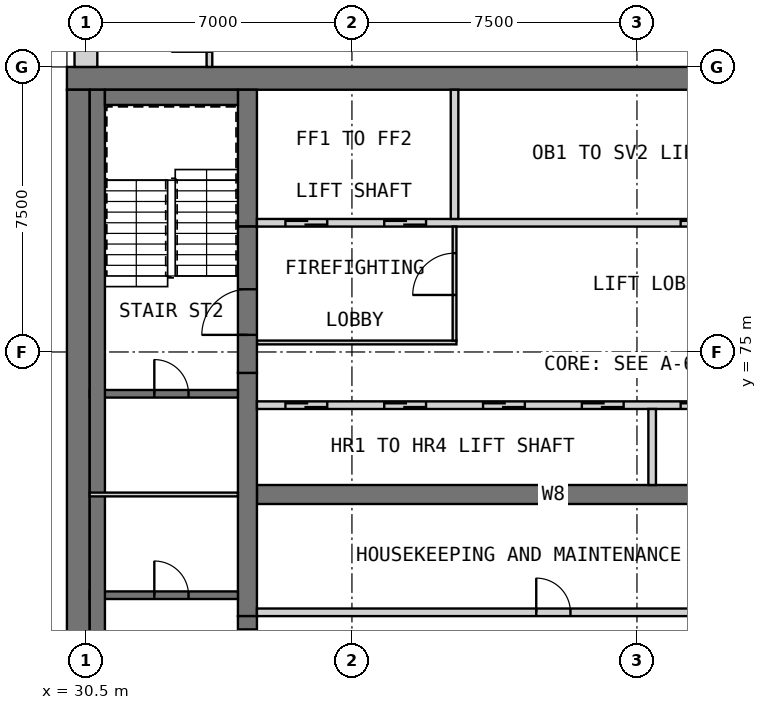
"""IFC4 building model, lengths in metres.
Left out: names, types, materials, properties, quantities, classifications, styles, units other than length and angle.
Written with IfcOpenShell. Run it as: python <this file> out.ifc"""

import sys

from ifc_helpers import new_model, si_unit, direction, frame, frame_2d, origin, place, context, subcontext, project, spatial, rectangle, extrude, element, fill, save


model = new_model("IFC4")
c1 = context("Model", 3, precision=1e-05, world=origin(), true_north=direction((0.0, 1.0)))
c2 = subcontext(c1, "Body", "Model", "MODEL_VIEW")
j1 = project(units=[si_unit("LENGTHUNIT", "METRE"), si_unit("PLANEANGLEUNIT", "RADIAN")], contexts=[c1])
p1 = place(None, origin())
s1 = spatial("IfcSite", under=j1, at=p1, CompositionType="ELEMENT")
p2 = place(p1, origin())
s2 = spatial("IfcBuilding", under=s1, at=p2, CompositionType="ELEMENT")
p3 = place(p2, frame((0.0, 0.0, 283.7)))
s3 = spatial("IfcBuildingStorey", under=s2, at=p3, CompositionType="ELEMENT", Elevation=283.7)
p4 = place(p3, frame((30.0, 82.2, 0.0), z_axis=(0.0, 0.0, 1.0), x_axis=(1.0, 0.0, 0.0)))
e1 = element("IfcWall", 1, at=p4, inside=s3, PredefinedType="SHEAR", context=c2, shape_type="SweptSolid", body=[
    extrude(rectangle(XDim=30.0, YDim=0.6, at=frame_2d((15.0, 0.0))), origin(), (0.0, 0.0, 1.0), 3.5),
])
p5 = place(p3, frame((30.3, 60.6, 0.0), z_axis=(0.0, 0.0, 1.0), x_axis=(0.0, 1.0, 0.0)))
e2 = element("IfcWall", 2, at=p5, inside=s3, PredefinedType="SHEAR", context=c2, shape_type="SweptSolid", body=[
    extrude(rectangle(XDim=21.3, YDim=0.6, at=frame_2d((10.65, 0.0))), origin(), (0.0, 0.0, 1.0), 3.5),
])
p6 = place(p3, frame((35.0, 71.25, 0.0), z_axis=(0.0, 0.0, 1.0), x_axis=(1.0, 0.0, 0.0)))
e3 = element("IfcWall", 3, at=p6, inside=s3, PredefinedType="SHEAR", context=c2, shape_type="SweptSolid", body=[
    extrude(rectangle(XDim=15.6, YDim=0.5, at=frame_2d((7.8, 0.0))), origin(), (0.0, 0.0, 1.0), 3.5),
])
p7 = place(p3, frame((34.75, 68.05, 0.0), z_axis=(0.0, 0.0, 1.0), x_axis=(0.0, 1.0, 0.0)))
e4 = element("IfcWall", 4, at=p7, inside=s3, PredefinedType="SHEAR", context=c2, shape_type="SweptSolid", body=[
    extrude(rectangle(XDim=6.4, YDim=0.5, at=frame_2d((3.2, 0.0))), origin(), (0.0, 0.0, 1.0), 3.5),
])
p8 = place(p3, frame((34.75, 78.3, 0.0), z_axis=(0.0, 0.0, 1.0), x_axis=(0.0, 1.0, 0.0)))
e5 = element("IfcWall", 5, at=p8, inside=s3, PredefinedType="SHEAR", context=c2, shape_type="SweptSolid", body=[
    extrude(rectangle(XDim=3.6, YDim=0.5, at=frame_2d((1.8, 0.0))), origin(), (0.0, 0.0, 1.0), 3.5),
])
p9 = place(p2, frame((0.0, 0.0, 34.0)))
s4 = spatial("IfcBuildingStorey", under=s2, at=p9, CompositionType="ELEMENT", Elevation=34.0)
for number, where, z_axis, x_axis in (
    (6, (29.7, 70.8, 0.0), (0.0, 0.0, 1.0), (0.0, 1.0, 0.0)),
    (7, (29.7, 75.675, 0.0), (0.0, 0.0, 1.0), (0.0, 1.0, 0.0)),
    (8, (29.7, 80.55, 0.0), (0.0, 0.0, 1.0), (0.0, 1.0, 0.0)),
):
    element("IfcWall", number, at=place(p9, frame(where, z_axis=z_axis, x_axis=x_axis)), inside=s4, PredefinedType="SOLIDWALL", context=c2, shape_type="SweptSolid", body=[
        extrude(rectangle(XDim=0.9, YDim=0.6, at=frame_2d((0.45, 0.0))), origin(), (0.0, 0.0, 1.0), 286.2),
    ])
p10 = place(p3, frame((30.5, 89.5, 0.0), z_axis=(0.0, 0.0, 1.0), x_axis=(0.0, -1.0, 0.0)))
e9 = element("IfcWall", 9, at=p10, inside=s3, PredefinedType="SOLIDWALL", context=c2, shape_type="SweptSolid", body=[
    extrude(rectangle(XDim=7.0, YDim=0.6, at=frame_2d((3.5, 0.0))), origin(), (0.0, 0.0, 1.0), 3.2),
])
p11 = place(p10, frame((3.925, 0.0, 0.8)))
e10 = element("IfcOpeningElement", 10, at=p11, cuts=e9, PredefinedType="OPENING", context=c2, shape_type="SweptSolid", body=[
    extrude(rectangle(XDim=2.4, YDim=1.8, at=frame_2d((1.2, 0.9))), frame((0.0, 0.31, 0.0), z_axis=(0.0, -1.0, 0.0), x_axis=(1.0, 0.0, 0.0)), (0.0, 0.0, 1.0), 0.62),
])
p12 = place(p10, frame((0.425, 0.0, 0.8)))
e11 = element("IfcOpeningElement", 11, at=p12, cuts=e9, PredefinedType="OPENING", context=c2, shape_type="SweptSolid", body=[
    extrude(rectangle(XDim=2.4, YDim=1.8, at=frame_2d((1.2, 0.9))), frame((0.0, 0.31, 0.0), z_axis=(0.0, -1.0, 0.0), x_axis=(1.0, 0.0, 0.0)), (0.0, 0.0, 1.0), 0.62),
])
p13 = place(p3, frame((35.0, 68.15, 0.0), z_axis=(0.0, 0.0, 1.0), x_axis=(1.0, 0.0, 0.0)))
e12 = element("IfcWall", 12, at=p13, inside=s3, PredefinedType="PARTITIONING", context=c2, shape_type="SweptSolid", body=[
    extrude(rectangle(XDim=15.6, YDim=0.2, at=frame_2d((7.8, 0.0))), origin(), (0.0, 0.0, 1.0), 3.2),
])
p14 = place(p13, frame((7.35, 0.0, 0.0)))
e13 = element("IfcOpeningElement", 13, at=p14, cuts=e12, PredefinedType="OPENING", context=c2, shape_type="SweptSolid", body=[
    extrude(rectangle(XDim=0.9, YDim=2.1, at=frame_2d((0.45, 1.05))), frame((0.0, 0.11, 0.0), z_axis=(0.0, -1.0, 0.0), x_axis=(1.0, 0.0, 0.0)), (0.0, 0.0, 1.0), 0.22),
])
p15 = place(p3, frame((35.0, 73.6, 0.0), z_axis=(0.0, 0.0, 1.0), x_axis=(1.0, 0.0, 0.0)))
e14 = element("IfcWall", 14, at=p15, inside=s3, PredefinedType="SOLIDWALL", context=c2, shape_type="SweptSolid", body=[
    extrude(rectangle(XDim=15.6, YDim=0.2, at=frame_2d((7.8, 0.0))), origin(), (0.0, 0.0, 1.0), 3.5),
])
p16 = place(p15, frame((0.75, 0.0, 0.0)))
e15 = element("IfcOpeningElement", 15, at=p16, cuts=e14, PredefinedType="OPENING", context=c2, shape_type="SweptSolid", body=[
    extrude(rectangle(XDim=1.1, YDim=2.1, at=frame_2d((0.55, 1.05))), frame((0.0, 0.11, 0.0), z_axis=(0.0, -1.0, 0.0), x_axis=(1.0, 0.0, 0.0)), (0.0, 0.0, 1.0), 0.22),
])
p17 = place(p15, frame((3.35, 0.0, 0.0)))
e16 = element("IfcOpeningElement", 16, at=p17, cuts=e14, PredefinedType="OPENING", context=c2, shape_type="SweptSolid", body=[
    extrude(rectangle(XDim=1.1, YDim=2.1, at=frame_2d((0.55, 1.05))), frame((0.0, 0.11, 0.0), z_axis=(0.0, -1.0, 0.0), x_axis=(1.0, 0.0, 0.0)), (0.0, 0.0, 1.0), 0.22),
])
p18 = place(p15, frame((5.95, 0.0, 0.0)))
e17 = element("IfcOpeningElement", 17, at=p18, cuts=e14, PredefinedType="OPENING", context=c2, shape_type="SweptSolid", body=[
    extrude(rectangle(XDim=1.1, YDim=2.1, at=frame_2d((0.55, 1.05))), frame((0.0, 0.11, 0.0), z_axis=(0.0, -1.0, 0.0), x_axis=(1.0, 0.0, 0.0)), (0.0, 0.0, 1.0), 0.22),
])
p19 = place(p15, frame((8.55, 0.0, 0.0)))
e18 = element("IfcOpeningElement", 18, at=p19, cuts=e14, PredefinedType="OPENING", context=c2, shape_type="SweptSolid", body=[
    extrude(rectangle(XDim=1.1, YDim=2.1, at=frame_2d((0.55, 1.05))), frame((0.0, 0.11, 0.0), z_axis=(0.0, -1.0, 0.0), x_axis=(1.0, 0.0, 0.0)), (0.0, 0.0, 1.0), 0.22),
])
p20 = place(p15, frame((11.15, 0.0, 0.0)))
e19 = element("IfcOpeningElement", 19, at=p20, cuts=e14, PredefinedType="OPENING", context=c2, shape_type="SweptSolid", body=[
    extrude(rectangle(XDim=1.1, YDim=2.1, at=frame_2d((0.55, 1.05))), frame((0.0, 0.11, 0.0), z_axis=(0.0, -1.0, 0.0), x_axis=(1.0, 0.0, 0.0)), (0.0, 0.0, 1.0), 0.22),
])
p21 = place(p15, frame((13.75, 0.0, 0.0)))
e20 = element("IfcOpeningElement", 20, at=p21, cuts=e14, PredefinedType="OPENING", context=c2, shape_type="SweptSolid", body=[
    extrude(rectangle(XDim=1.1, YDim=2.1, at=frame_2d((0.55, 1.05))), frame((0.0, 0.11, 0.0), z_axis=(0.0, -1.0, 0.0), x_axis=(1.0, 0.0, 0.0)), (0.0, 0.0, 1.0), 0.22),
])
p22 = place(p3, frame((45.4, 71.5, 0.0), z_axis=(0.0, 0.0, 1.0), x_axis=(0.0, 1.0, 0.0)))
e21 = element("IfcWall", 21, at=p22, inside=s3, PredefinedType="SOLIDWALL", context=c2, shape_type="SweptSolid", body=[
    extrude(rectangle(XDim=2.0, YDim=0.2, at=frame_2d((1.0, 0.0))), origin(), (0.0, 0.0, 1.0), 3.5),
])
p23 = place(p3, frame((35.0, 78.4, 0.0), z_axis=(0.0, 0.0, 1.0), x_axis=(1.0, 0.0, 0.0)))
e22 = element("IfcWall", 22, at=p23, inside=s3, PredefinedType="SOLIDWALL", context=c2, shape_type="SweptSolid", body=[
    extrude(rectangle(XDim=15.6, YDim=0.2, at=frame_2d((7.8, 0.0))), origin(), (0.0, 0.0, 1.0), 3.5),
])
p24 = place(p23, frame((0.75, 0.0, 0.0)))
e23 = element("IfcOpeningElement", 23, at=p24, cuts=e22, PredefinedType="OPENING", context=c2, shape_type="SweptSolid", body=[
    extrude(rectangle(XDim=1.1, YDim=2.1, at=frame_2d((0.55, 1.05))), frame((0.0, 0.11, 0.0), z_axis=(0.0, -1.0, 0.0), x_axis=(1.0, 0.0, 0.0)), (0.0, 0.0, 1.0), 0.22),
])
p25 = place(p23, frame((3.35, 0.0, 0.0)))
e24 = element("IfcOpeningElement", 24, at=p25, cuts=e22, PredefinedType="OPENING", context=c2, shape_type="SweptSolid", body=[
    extrude(rectangle(XDim=1.1, YDim=2.1, at=frame_2d((0.55, 1.05))), frame((0.0, 0.11, 0.0), z_axis=(0.0, -1.0, 0.0), x_axis=(1.0, 0.0, 0.0)), (0.0, 0.0, 1.0), 0.22),
])
p26 = place(p23, frame((11.15, 0.0, 0.0)))
e25 = element("IfcOpeningElement", 25, at=p26, cuts=e22, PredefinedType="OPENING", context=c2, shape_type="SweptSolid", body=[
    extrude(rectangle(XDim=1.1, YDim=2.1, at=frame_2d((0.55, 1.05))), frame((0.0, 0.11, 0.0), z_axis=(0.0, -1.0, 0.0), x_axis=(1.0, 0.0, 0.0)), (0.0, 0.0, 1.0), 0.22),
])
p27 = place(p23, frame((13.75, 0.0, 0.0)))
e26 = element("IfcOpeningElement", 26, at=p27, cuts=e22, PredefinedType="OPENING", context=c2, shape_type="SweptSolid", body=[
    extrude(rectangle(XDim=1.1, YDim=2.1, at=frame_2d((0.55, 1.05))), frame((0.0, 0.11, 0.0), z_axis=(0.0, -1.0, 0.0), x_axis=(1.0, 0.0, 0.0)), (0.0, 0.0, 1.0), 0.22),
])
p28 = place(p3, frame((40.2, 78.5, 0.0), z_axis=(0.0, 0.0, 1.0), x_axis=(0.0, 1.0, 0.0)))
e27 = element("IfcWall", 27, at=p28, inside=s3, PredefinedType="SOLIDWALL", context=c2, shape_type="SweptSolid", body=[
    extrude(rectangle(XDim=3.4, YDim=0.2, at=frame_2d((1.7, 0.0))), origin(), (0.0, 0.0, 1.0), 3.5),
])
p29 = place(p3, frame((35.0, 75.25, 0.0), z_axis=(0.0, 0.0, 1.0), x_axis=(1.0, 0.0, 0.0)))
e28 = element("IfcWall", 28, at=p29, inside=s3, PredefinedType="PARTITIONING", context=c2, shape_type="SweptSolid", body=[
    extrude(rectangle(XDim=5.25, YDim=0.1, at=frame_2d((2.625, 0.0))), origin(), (0.0, 0.0, 1.0), 3.2),
])
p30 = place(p3, frame((40.2, 75.3, 0.0), z_axis=(0.0, 0.0, 1.0), x_axis=(0.0, 1.0, 0.0)))
e29 = element("IfcWall", 29, at=p30, inside=s3, PredefinedType="PARTITIONING", context=c2, shape_type="SweptSolid", body=[
    extrude(rectangle(XDim=3.0, YDim=0.1, at=frame_2d((1.5, 0.0))), origin(), (0.0, 0.0, 1.0), 3.2),
])
p31 = place(p30, frame((1.2, 0.0, 0.0)))
e30 = element("IfcOpeningElement", 30, at=p31, cuts=e29, PredefinedType="OPENING", context=c2, shape_type="SweptSolid", body=[
    extrude(rectangle(XDim=1.1, YDim=2.1, at=frame_2d((0.55, 1.05))), frame((0.0, 0.06, 0.0), z_axis=(0.0, -1.0, 0.0), x_axis=(1.0, 0.0, 0.0)), (0.0, 0.0, 1.0), 0.12),
])
p32 = place(p3, frame((34.75, 64.2, 0.0), z_axis=(0.0, 0.0, 1.0), x_axis=(0.0, 1.0, 0.0)))
e31 = element("IfcWall", 31, at=p32, inside=s3, PredefinedType="SOLIDWALL", context=c2, shape_type="SweptSolid", body=[
    extrude(rectangle(XDim=3.85, YDim=0.5, at=frame_2d((1.925, 0.0))), origin(), (0.0, 0.0, 1.0), 2.3),
])
p33 = place(p32, frame((2.3, 0.0, 0.0)))
e32 = element("IfcOpeningElement", 32, at=p33, cuts=e31, PredefinedType="OPENING", context=c2, shape_type="SweptSolid", body=[
    extrude(rectangle(XDim=1.2, YDim=2.1, at=frame_2d((0.6, 1.05))), frame((0.0, 0.26, 0.0), z_axis=(0.0, -1.0, 0.0), x_axis=(1.0, 0.0, 0.0)), (0.0, 0.0, 1.0), 0.52),
])
p34 = place(p3, frame((34.75, 74.45, 0.0), z_axis=(0.0, 0.0, 1.0), x_axis=(0.0, 1.0, 0.0)))
e33 = element("IfcWall", 33, at=p34, inside=s3, PredefinedType="SOLIDWALL", context=c2, shape_type="SweptSolid", body=[
    extrude(rectangle(XDim=3.85, YDim=0.5, at=frame_2d((1.925, 0.0))), origin(), (0.0, 0.0, 1.0), 2.3),
])
p35 = place(p34, frame((1.0, 0.0, 0.0)))
e34 = element("IfcOpeningElement", 34, at=p35, cuts=e33, PredefinedType="OPENING", context=c2, shape_type="SweptSolid", body=[
    extrude(rectangle(XDim=1.2, YDim=2.1, at=frame_2d((0.6, 1.05))), frame((0.0, 0.26, 0.0), z_axis=(0.0, -1.0, 0.0), x_axis=(1.0, 0.0, 0.0)), (0.0, 0.0, 1.0), 0.52),
])
p36 = place(p3, frame((30.6, 68.6, 0.0), z_axis=(0.0, 0.0, 1.0), x_axis=(1.0, 0.0, 0.0)))
e35 = element("IfcWall", 35, at=p36, inside=s3, PredefinedType="SOLIDWALL", context=c2, shape_type="SweptSolid", body=[
    extrude(rectangle(XDim=3.9, YDim=0.2, at=frame_2d((1.95, 0.0))), origin(), (0.0, 0.0, 1.0), 3.2),
])
p37 = place(p36, frame((1.7, 0.0, 0.0)))
e36 = element("IfcOpeningElement", 36, at=p37, cuts=e35, PredefinedType="OPENING", context=c2, shape_type="SweptSolid", body=[
    extrude(rectangle(XDim=0.9, YDim=2.1, at=frame_2d((0.45, 1.05))), frame((0.0, 0.11, 0.0), z_axis=(0.0, -1.0, 0.0), x_axis=(1.0, 0.0, 0.0)), (0.0, 0.0, 1.0), 0.22),
])
p38 = place(p3, frame((30.6, 73.9, 0.0), z_axis=(0.0, 0.0, 1.0), x_axis=(1.0, 0.0, 0.0)))
e37 = element("IfcWall", 37, at=p38, inside=s3, PredefinedType="SOLIDWALL", context=c2, shape_type="SweptSolid", body=[
    extrude(rectangle(XDim=3.9, YDim=0.2, at=frame_2d((1.95, 0.0))), origin(), (0.0, 0.0, 1.0), 3.2),
])
p39 = place(p38, frame((1.7, 0.0, 0.0)))
e38 = element("IfcOpeningElement", 38, at=p39, cuts=e37, PredefinedType="OPENING", context=c2, shape_type="SweptSolid", body=[
    extrude(rectangle(XDim=0.9, YDim=2.1, at=frame_2d((0.45, 1.05))), frame((0.0, 0.11, 0.0), z_axis=(0.0, -1.0, 0.0), x_axis=(1.0, 0.0, 0.0)), (0.0, 0.0, 1.0), 0.22),
])
p40 = place(p3, frame((30.8, 60.6, 0.0), z_axis=(0.0, 0.0, 1.0), x_axis=(0.0, 1.0, 0.0)))
e39 = element("IfcWall", 39, at=p40, inside=s3, PredefinedType="SOLIDWALL", context=c2, shape_type="SweptSolid", body=[
    extrude(rectangle(XDim=21.3, YDim=0.4, at=frame_2d((10.65, 0.0))), origin(), (0.0, 0.0, 1.0), 3.2),
])
p41 = place(p3, frame((31.0, 81.7, 0.0), z_axis=(0.0, 0.0, 1.0), x_axis=(1.0, 0.0, 0.0)))
e40 = element("IfcWall", 40, at=p41, inside=s3, PredefinedType="SOLIDWALL", context=c2, shape_type="SweptSolid", body=[
    extrude(rectangle(XDim=3.5, YDim=0.4, at=frame_2d((1.75, 0.0))), origin(), (0.0, 0.0, 1.0), 3.2),
])
p42 = place(p3, frame((30.6, 71.25, 0.0), z_axis=(0.0, 0.0, 1.0), x_axis=(1.0, 0.0, 0.0)))
e41 = element("IfcWall", 41, at=p42, inside=s3, PredefinedType="PARTITIONING", context=c2, shape_type="SweptSolid", body=[
    extrude(rectangle(XDim=3.9, YDim=0.1, at=frame_2d((1.95, 0.0))), origin(), (0.0, 0.0, 1.0), 3.2),
])
p43 = place(p3, frame((33.75, 82.5, 0.0), z_axis=(0.0, 0.0, 1.0), x_axis=(0.0, 1.0, 0.0)))
e42 = element("IfcWall", 42, at=p43, inside=s3, PredefinedType="PARTITIONING", context=c2, shape_type="SweptSolid", body=[
    extrude(rectangle(XDim=1.725, YDim=0.15, at=frame_2d((0.863, 0.0))), origin(), (0.0, 0.0, 1.0), 3.2),
])
p44 = place(p43, frame((0.4, 0.0, 0.0)))
e43 = element("IfcOpeningElement", 43, at=p44, cuts=e42, PredefinedType="OPENING", context=c2, shape_type="SweptSolid", body=[
    extrude(rectangle(XDim=1.0, YDim=2.1, at=frame_2d((0.5, 1.05))), frame((0.0, 0.085, 0.0), z_axis=(0.0, -1.0, 0.0), x_axis=(1.0, 0.0, 0.0)), (0.0, 0.0, 1.0), 0.17),
])
p45 = place(p14, origin())
e44 = element("IfcDoor", 44, at=p45, inside=s3, OperationType="SINGLE_SWING_LEFT", PredefinedType="DOOR", context=c2, shape_type="SweptSolid", body=[
    extrude(rectangle(XDim=0.9, YDim=2.1, at=frame_2d((0.45, 1.05))), frame((0.0, 0.025, 0.0), z_axis=(0.0, -1.0, 0.0), x_axis=(1.0, 0.0, 0.0)), (0.0, 0.0, 1.0), 0.05),
])
fill(e13, e44)
p46 = place(p16, origin())
e45 = element("IfcDoor", 45, at=p46, inside=s3, OperationType="DOUBLE_DOOR_SLIDING", PredefinedType="DOOR", context=c2, shape_type="SweptSolid", body=[
    extrude(rectangle(XDim=1.1, YDim=2.1, at=frame_2d((0.55, 1.05))), frame((0.0, 0.025, 0.0), z_axis=(0.0, -1.0, 0.0), x_axis=(1.0, 0.0, 0.0)), (0.0, 0.0, 1.0), 0.05),
])
fill(e15, e45)
p47 = place(p17, origin())
e46 = element("IfcDoor", 46, at=p47, inside=s3, OperationType="DOUBLE_DOOR_SLIDING", PredefinedType="DOOR", context=c2, shape_type="SweptSolid", body=[
    extrude(rectangle(XDim=1.1, YDim=2.1, at=frame_2d((0.55, 1.05))), frame((0.0, 0.025, 0.0), z_axis=(0.0, -1.0, 0.0), x_axis=(1.0, 0.0, 0.0)), (0.0, 0.0, 1.0), 0.05),
])
fill(e16, e46)
p48 = place(p18, origin())
e47 = element("IfcDoor", 47, at=p48, inside=s3, OperationType="DOUBLE_DOOR_SLIDING", PredefinedType="DOOR", context=c2, shape_type="SweptSolid", body=[
    extrude(rectangle(XDim=1.1, YDim=2.1, at=frame_2d((0.55, 1.05))), frame((0.0, 0.025, 0.0), z_axis=(0.0, -1.0, 0.0), x_axis=(1.0, 0.0, 0.0)), (0.0, 0.0, 1.0), 0.05),
])
fill(e17, e47)
p49 = place(p19, origin())
e48 = element("IfcDoor", 48, at=p49, inside=s3, OperationType="DOUBLE_DOOR_SLIDING", PredefinedType="DOOR", context=c2, shape_type="SweptSolid", body=[
    extrude(rectangle(XDim=1.1, YDim=2.1, at=frame_2d((0.55, 1.05))), frame((0.0, 0.025, 0.0), z_axis=(0.0, -1.0, 0.0), x_axis=(1.0, 0.0, 0.0)), (0.0, 0.0, 1.0), 0.05),
])
fill(e18, e48)
p50 = place(p20, origin())
e49 = element("IfcDoor", 49, at=p50, inside=s3, OperationType="DOUBLE_DOOR_SLIDING", PredefinedType="DOOR", context=c2, shape_type="SweptSolid", body=[
    extrude(rectangle(XDim=1.1, YDim=2.1, at=frame_2d((0.55, 1.05))), frame((0.0, 0.025, 0.0), z_axis=(0.0, -1.0, 0.0), x_axis=(1.0, 0.0, 0.0)), (0.0, 0.0, 1.0), 0.05),
])
fill(e19, e49)
p51 = place(p24, origin())
e50 = element("IfcDoor", 50, at=p51, inside=s3, OperationType="DOUBLE_DOOR_SLIDING", PredefinedType="DOOR", context=c2, shape_type="SweptSolid", body=[
    extrude(rectangle(XDim=1.1, YDim=2.1, at=frame_2d((0.55, 1.05))), frame((0.0, 0.025, 0.0), z_axis=(0.0, -1.0, 0.0), x_axis=(1.0, 0.0, 0.0)), (0.0, 0.0, 1.0), 0.05),
])
fill(e23, e50)
p52 = place(p25, origin())
e51 = element("IfcDoor", 51, at=p52, inside=s3, OperationType="DOUBLE_DOOR_SLIDING", PredefinedType="DOOR", context=c2, shape_type="SweptSolid", body=[
    extrude(rectangle(XDim=1.1, YDim=2.1, at=frame_2d((0.55, 1.05))), frame((0.0, 0.025, 0.0), z_axis=(0.0, -1.0, 0.0), x_axis=(1.0, 0.0, 0.0)), (0.0, 0.0, 1.0), 0.05),
])
fill(e24, e51)
p53 = place(p26, origin())
e52 = element("IfcDoor", 52, at=p53, inside=s3, OperationType="DOUBLE_DOOR_SLIDING", PredefinedType="DOOR", context=c2, shape_type="SweptSolid", body=[
    extrude(rectangle(XDim=1.1, YDim=2.1, at=frame_2d((0.55, 1.05))), frame((0.0, 0.025, 0.0), z_axis=(0.0, -1.0, 0.0), x_axis=(1.0, 0.0, 0.0)), (0.0, 0.0, 1.0), 0.05),
])
fill(e25, e52)
p54 = place(p31, origin())
e53 = element("IfcDoor", 53, at=p54, inside=s3, OperationType="SINGLE_SWING_LEFT", PredefinedType="DOOR", context=c2, shape_type="SweptSolid", body=[
    extrude(rectangle(XDim=1.1, YDim=2.1, at=frame_2d((0.55, 1.05))), frame((0.0, 0.025, 0.0), z_axis=(0.0, -1.0, 0.0), x_axis=(1.0, 0.0, 0.0)), (0.0, 0.0, 1.0), 0.05),
])
fill(e30, e53)
p55 = place(p33, origin())
e54 = element("IfcDoor", 54, at=p55, inside=s3, OperationType="SINGLE_SWING_LEFT", PredefinedType="DOOR", context=c2, shape_type="SweptSolid", body=[
    extrude(rectangle(XDim=1.2, YDim=2.1, at=frame_2d((0.6, 1.05))), frame((0.0, 0.025, 0.0), z_axis=(0.0, -1.0, 0.0), x_axis=(1.0, 0.0, 0.0)), (0.0, 0.0, 1.0), 0.05),
])
fill(e32, e54)
p56 = place(p35, origin())
e55 = element("IfcDoor", 55, at=p56, inside=s3, OperationType="SINGLE_SWING_RIGHT", PredefinedType="DOOR", context=c2, shape_type="SweptSolid", body=[
    extrude(rectangle(XDim=1.2, YDim=2.1, at=frame_2d((0.6, 1.05))), frame((0.0, 0.025, 0.0), z_axis=(0.0, -1.0, 0.0), x_axis=(1.0, 0.0, 0.0)), (0.0, 0.0, 1.0), 0.05),
])
fill(e34, e55)
p57 = place(p37, origin())
e56 = element("IfcDoor", 56, at=p57, inside=s3, OperationType="SINGLE_SWING_LEFT", PredefinedType="DOOR", context=c2, shape_type="SweptSolid", body=[
    extrude(rectangle(XDim=0.9, YDim=2.1, at=frame_2d((0.45, 1.05))), frame((0.0, 0.025, 0.0), z_axis=(0.0, -1.0, 0.0), x_axis=(1.0, 0.0, 0.0)), (0.0, 0.0, 1.0), 0.05),
])
fill(e36, e56)
p58 = place(p39, origin())
e57 = element("IfcDoor", 57, at=p58, inside=s3, OperationType="SINGLE_SWING_RIGHT", PredefinedType="DOOR", context=c2, shape_type="SweptSolid", body=[
    extrude(rectangle(XDim=0.9, YDim=2.1, at=frame_2d((0.45, 1.05))), frame((0.0, 0.025, 0.0), z_axis=(0.0, -1.0, 0.0), x_axis=(1.0, 0.0, 0.0)), (0.0, 0.0, 1.0), 0.05),
])
fill(e38, e57)
save(model, sys.argv[1])
